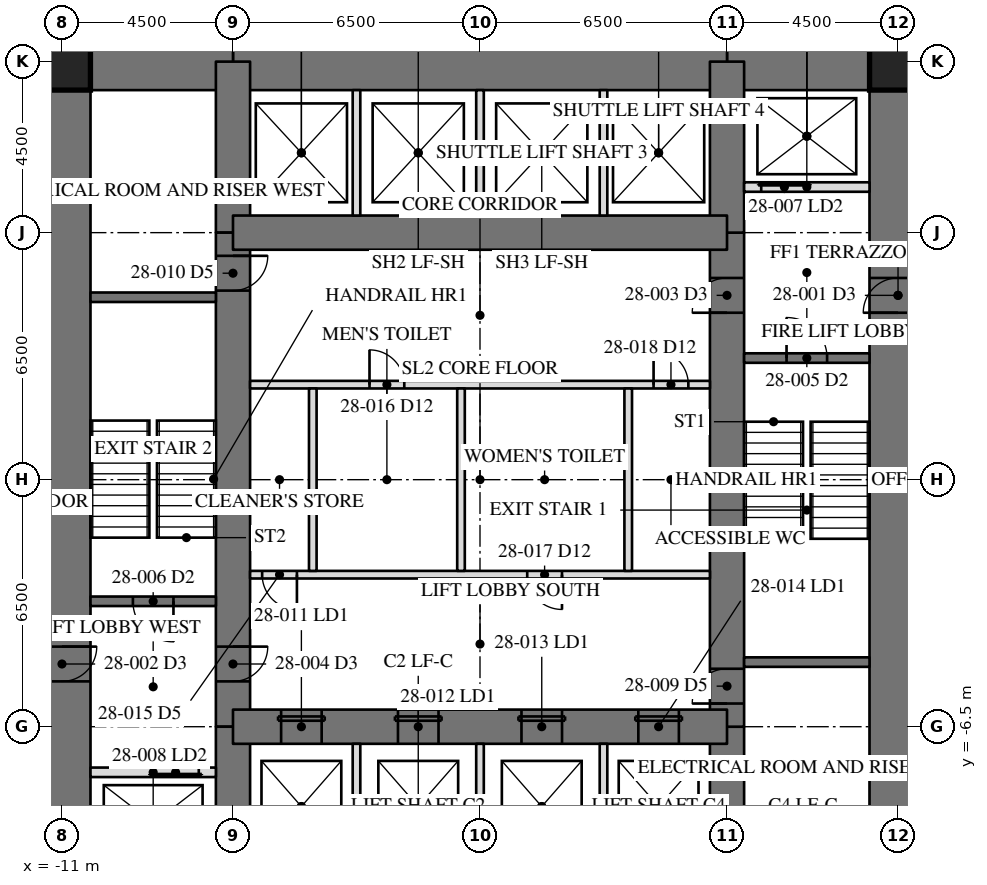
"""IFC4 building model, lengths in metres.
Left out: names, types, materials, properties, quantities, classifications, styles, units other than length and angle.
Written with IfcOpenShell. Run it as: python <this file> out.ifc"""

import sys

from ifc_helpers import new_model, si_unit, direction, frame, frame_2d, origin, origin_2d, place, context, subcontext, project, spatial, rectangle, hollow_rectangle, extrude, element, fill, save


model = new_model("IFC4")
c1 = context("Model", 3, precision=1e-05, world=origin(), true_north=direction((0.0, 1.0)))
c2 = subcontext(c1, "Body", "Model", "MODEL_VIEW")
j1 = project(units=[si_unit("LENGTHUNIT", "METRE"), si_unit("PLANEANGLEUNIT", "RADIAN")], contexts=[c1])
p1 = place(None, origin())
s1 = spatial("IfcSite", under=j1, at=p1, CompositionType="ELEMENT")
p2 = place(p1, origin())
s2 = spatial("IfcBuilding", under=s1, at=p2, CompositionType="ELEMENT")
p3 = place(p2, frame((0.0, 0.0, 121.3)))
s3 = spatial("IfcBuildingStorey", under=s2, at=p3, CompositionType="ELEMENT", Elevation=121.3)
p4 = place(p3, frame((11.0, -11.0, 0.0), z_axis=(0.0, 0.0, 1.0), x_axis=(0.0, 1.0, 0.0)))
e1 = element("IfcWall", 1, at=p4, inside=s3, PredefinedType="SHEAR", context=c2, shape_type="SweptSolid", body=[
    extrude(rectangle(XDim=22.0, YDim=1.5, at=frame_2d((11.0, 0.0))), origin(), (0.0, 0.0, 1.0), 4.1),
])
p5 = place(p4, frame((15.393, 0.0, 0.0)))
e2 = element("IfcOpeningElement", 2, at=p5, cuts=e1, PredefinedType="OPENING", context=c2, shape_type="SweptSolid", body=[
    extrude(rectangle(XDim=0.915, YDim=2.134, at=frame_2d((0.458, 1.067))), frame((0.0, 0.76, 0.0), z_axis=(0.0, -1.0, 0.0), x_axis=(1.0, 0.0, 0.0)), (0.0, 0.0, 1.0), 1.52),
])
p6 = place(p3, frame((-11.0, 11.0, 0.0), z_axis=(0.0, 0.0, 1.0), x_axis=(0.0, -1.0, 0.0)))
e3 = element("IfcWall", 3, at=p6, inside=s3, PredefinedType="SHEAR", context=c2, shape_type="SweptSolid", body=[
    extrude(rectangle(XDim=22.0, YDim=1.5, at=frame_2d((11.0, 0.0))), origin(), (0.0, 0.0, 1.0), 4.1),
])
p7 = place(p6, frame((15.393, 0.0, 0.0)))
e4 = element("IfcOpeningElement", 4, at=p7, cuts=e3, PredefinedType="OPENING", context=c2, shape_type="SweptSolid", body=[
    extrude(rectangle(XDim=0.915, YDim=2.134, at=frame_2d((0.458, 1.067))), frame((0.0, 0.76, 0.0), z_axis=(0.0, -1.0, 0.0), x_axis=(1.0, 0.0, 0.0)), (0.0, 0.0, 1.0), 1.52),
])
p8 = place(p3, frame((11.0, 11.0, 0.0), z_axis=(0.0, 0.0, 1.0), x_axis=(-1.0, 0.0, 0.0)))
e5 = element("IfcWall", 5, at=p8, inside=s3, PredefinedType="SHEAR", context=c2, shape_type="SweptSolid", body=[
    extrude(rectangle(XDim=4.5, YDim=1.5, at=frame_2d((2.25, 0.0))), origin(), (0.0, 0.0, 1.0), 4.1),
])
p9 = place(p3, frame((6.5, 11.0, 0.0), z_axis=(0.0, 0.0, 1.0), x_axis=(-1.0, 0.0, 0.0)))
e6 = element("IfcWall", 6, at=p9, inside=s3, PredefinedType="SHEAR", context=c2, shape_type="SweptSolid", body=[
    extrude(rectangle(XDim=13.0, YDim=1.5, at=frame_2d((6.5, 0.0))), origin(), (0.0, 0.0, 1.0), 4.1),
])
p10 = place(p3, frame((-6.5, 11.0, 0.0), z_axis=(0.0, 0.0, 1.0), x_axis=(-1.0, 0.0, 0.0)))
e7 = element("IfcWall", 7, at=p10, inside=s3, PredefinedType="SHEAR", context=c2, shape_type="SweptSolid", body=[
    extrude(rectangle(XDim=4.5, YDim=1.5, at=frame_2d((2.25, 0.0))), origin(), (0.0, 0.0, 1.0), 4.1),
])
p11 = place(p3, frame((6.5, -11.0, 0.0), z_axis=(0.0, 0.0, 1.0), x_axis=(0.0, 1.0, 0.0)))
e8 = element("IfcWall", 8, at=p11, inside=s3, PredefinedType="SHEAR", context=c2, shape_type="SweptSolid", body=[
    extrude(rectangle(XDim=4.5, YDim=0.9, at=frame_2d((2.25, 0.0))), origin(), (0.0, 0.0, 1.0), 4.1),
])
p12 = place(p3, frame((6.5, -6.5, 0.0), z_axis=(0.0, 0.0, 1.0), x_axis=(0.0, 1.0, 0.0)))
e9 = element("IfcWall", 9, at=p12, inside=s3, PredefinedType="SHEAR", context=c2, shape_type="SweptSolid", body=[
    extrude(rectangle(XDim=13.0, YDim=0.9, at=frame_2d((6.5, 0.0))), origin(), (0.0, 0.0, 1.0), 4.1),
])
p13 = place(p12, frame((10.893, 0.0, 0.0)))
e10 = element("IfcOpeningElement", 10, at=p13, cuts=e9, PredefinedType="OPENING", context=c2, shape_type="SweptSolid", body=[
    extrude(rectangle(XDim=0.915, YDim=2.134, at=frame_2d((0.458, 1.067))), frame((0.0, 0.46, 0.0), z_axis=(0.0, -1.0, 0.0), x_axis=(1.0, 0.0, 0.0)), (0.0, 0.0, 1.0), 0.92),
])
p14 = place(p12, frame((0.61, 0.0, 0.0)))
e11 = element("IfcOpeningElement", 11, at=p14, cuts=e9, PredefinedType="OPENING", context=c2, shape_type="SweptSolid", body=[
    extrude(rectangle(XDim=0.915, YDim=2.134, at=frame_2d((0.458, 1.067))), frame((0.0, 0.46, 0.0), z_axis=(0.0, -1.0, 0.0), x_axis=(1.0, 0.0, 0.0)), (0.0, 0.0, 1.0), 0.92),
])
for number, where, z_axis, x_axis in (
    (12, (6.5, 6.5, 0.0), (0.0, 0.0, 1.0), (0.0, 1.0, 0.0)),
    (13, (-6.5, 11.0, 0.0), (0.0, 0.0, 1.0), (0.0, -1.0, 0.0)),
):
    element("IfcWall", number, at=place(p3, frame(where, z_axis=z_axis, x_axis=x_axis)), inside=s3, PredefinedType="SHEAR", context=c2, shape_type="SweptSolid", body=[
        extrude(rectangle(XDim=4.5, YDim=0.9, at=frame_2d((2.25, 0.0))), origin(), (0.0, 0.0, 1.0), 4.1),
    ])
p15 = place(p3, frame((-6.5, 6.5, 0.0), z_axis=(0.0, 0.0, 1.0), x_axis=(0.0, -1.0, 0.0)))
e14 = element("IfcWall", 14, at=p15, inside=s3, PredefinedType="SHEAR", context=c2, shape_type="SweptSolid", body=[
    extrude(rectangle(XDim=13.0, YDim=0.9, at=frame_2d((6.5, 0.0))), origin(), (0.0, 0.0, 1.0), 4.1),
])
p16 = place(p15, frame((10.893, 0.0, 0.0)))
e15 = element("IfcOpeningElement", 15, at=p16, cuts=e14, PredefinedType="OPENING", context=c2, shape_type="SweptSolid", body=[
    extrude(rectangle(XDim=0.915, YDim=2.134, at=frame_2d((0.458, 1.067))), frame((0.0, 0.46, 0.0), z_axis=(0.0, -1.0, 0.0), x_axis=(1.0, 0.0, 0.0)), (0.0, 0.0, 1.0), 0.92),
])
p17 = place(p15, frame((0.61, 0.0, 0.0)))
e16 = element("IfcOpeningElement", 16, at=p17, cuts=e14, PredefinedType="OPENING", context=c2, shape_type="SweptSolid", body=[
    extrude(rectangle(XDim=0.915, YDim=2.134, at=frame_2d((0.458, 1.067))), frame((0.0, 0.46, 0.0), z_axis=(0.0, -1.0, 0.0), x_axis=(1.0, 0.0, 0.0)), (0.0, 0.0, 1.0), 0.92),
])
p18 = place(p3, frame((-6.5, -6.5, 0.0), z_axis=(0.0, 0.0, 1.0), x_axis=(0.0, -1.0, 0.0)))
e17 = element("IfcWall", 17, at=p18, inside=s3, PredefinedType="SHEAR", context=c2, shape_type="SweptSolid", body=[
    extrude(rectangle(XDim=4.5, YDim=0.9, at=frame_2d((2.25, 0.0))), origin(), (0.0, 0.0, 1.0), 4.1),
])
p19 = place(p3, frame((6.5, 6.5, 0.0), z_axis=(0.0, 0.0, 1.0), x_axis=(-1.0, 0.0, 0.0)))
e18 = element("IfcWall", 18, at=p19, inside=s3, PredefinedType="SHEAR", context=c2, shape_type="SweptSolid", body=[
    extrude(rectangle(XDim=13.0, YDim=0.9, at=frame_2d((6.5, 0.0))), origin(), (0.0, 0.0, 1.0), 4.1),
])
p20 = place(p3, frame((-6.5, -6.5, 0.0), z_axis=(0.0, 0.0, 1.0), x_axis=(1.0, 0.0, 0.0)))
e19 = element("IfcWall", 19, at=p20, inside=s3, PredefinedType="SHEAR", context=c2, shape_type="SweptSolid", body=[
    extrude(rectangle(XDim=13.0, YDim=0.9, at=frame_2d((6.5, 0.0))), origin(), (0.0, 0.0, 1.0), 4.1),
])
p21 = place(p20, frame((1.267, 0.0, 0.0)))
e20 = element("IfcOpeningElement", 20, at=p21, cuts=e19, PredefinedType="OPENING", context=c2, shape_type="SweptSolid", body=[
    extrude(rectangle(XDim=1.067, YDim=2.134, at=frame_2d((0.533, 1.067))), frame((0.0, 0.46, 0.0), z_axis=(0.0, -1.0, 0.0), x_axis=(1.0, 0.0, 0.0)), (0.0, 0.0, 1.0), 0.92),
])
p22 = place(p20, frame((4.342, 0.0, 0.0)))
e21 = element("IfcOpeningElement", 21, at=p22, cuts=e19, PredefinedType="OPENING", context=c2, shape_type="SweptSolid", body=[
    extrude(rectangle(XDim=1.067, YDim=2.134, at=frame_2d((0.533, 1.067))), frame((0.0, 0.46, 0.0), z_axis=(0.0, -1.0, 0.0), x_axis=(1.0, 0.0, 0.0)), (0.0, 0.0, 1.0), 0.92),
])
p23 = place(p20, frame((7.592, 0.0, 0.0)))
e22 = element("IfcOpeningElement", 22, at=p23, cuts=e19, PredefinedType="OPENING", context=c2, shape_type="SweptSolid", body=[
    extrude(rectangle(XDim=1.067, YDim=2.134, at=frame_2d((0.533, 1.067))), frame((0.0, 0.46, 0.0), z_axis=(0.0, -1.0, 0.0), x_axis=(1.0, 0.0, 0.0)), (0.0, 0.0, 1.0), 0.92),
])
p24 = place(p20, frame((10.667, 0.0, 0.0)))
e23 = element("IfcOpeningElement", 23, at=p24, cuts=e19, PredefinedType="OPENING", context=c2, shape_type="SweptSolid", body=[
    extrude(rectangle(XDim=1.067, YDim=2.134, at=frame_2d((0.533, 1.067))), frame((0.0, 0.46, 0.0), z_axis=(0.0, -1.0, 0.0), x_axis=(1.0, 0.0, 0.0)), (0.0, 0.0, 1.0), 0.92),
])
for number, where, z_axis, x_axis in (
    (24, (11.0, 11.0, 0.0), (0.0, 0.0, 1.0), (1.0, 0.0, 0.0)),
    (25, (-11.0, 11.0, 0.0), (0.0, 0.0, 1.0), (1.0, 0.0, 0.0)),
):
    element("IfcColumn", number, at=place(p3, frame(where, z_axis=z_axis, x_axis=x_axis)), inside=s3, PredefinedType="COLUMN", context=c2, shape_type="SweptSolid", body=[
        extrude(hollow_rectangle(XDim=1.499, YDim=1.499, WallThickness=0.102, at=origin_2d()), origin(), (0.0, 0.0, 1.0), 4.1),
    ])
for number, where, z_axis, x_axis in (
    (26, (6.95, -4.8, 0.0), (0.0, 0.0, 1.0), (1.0, 0.0, 0.0)),
    (27, (-6.95, 4.8, 0.0), (0.0, 0.0, 1.0), (-1.0, 0.0, 0.0)),
):
    element("IfcWall", number, at=place(p3, frame(where, z_axis=z_axis, x_axis=x_axis)), inside=s3, PredefinedType="SOLIDWALL", context=c2, shape_type="SweptSolid", body=[
        extrude(rectangle(XDim=3.3, YDim=0.25, at=frame_2d((1.65, 0.0))), origin(), (0.0, 0.0, 1.0), 3.91),
    ])
p25 = place(p3, frame((6.95, 3.2, 0.0), z_axis=(0.0, 0.0, 1.0), x_axis=(1.0, 0.0, 0.0)))
e28 = element("IfcWall", 28, at=p25, inside=s3, PredefinedType="SOLIDWALL", context=c2, shape_type="SweptSolid", body=[
    extrude(rectangle(XDim=3.3, YDim=0.25, at=frame_2d((1.65, 0.0))), origin(), (0.0, 0.0, 1.0), 3.91),
])
p26 = place(p25, frame((1.116, 0.0, 0.0)))
e29 = element("IfcOpeningElement", 29, at=p26, cuts=e28, PredefinedType="OPENING", context=c2, shape_type="SweptSolid", body=[
    extrude(rectangle(XDim=1.067, YDim=2.134, at=frame_2d((0.533, 1.067))), frame((0.0, 0.135, 0.0), z_axis=(0.0, -1.0, 0.0), x_axis=(1.0, 0.0, 0.0)), (0.0, 0.0, 1.0), 0.27),
])
p27 = place(p3, frame((-6.95, -3.2, 0.0), z_axis=(0.0, 0.0, 1.0), x_axis=(-1.0, 0.0, 0.0)))
e30 = element("IfcWall", 30, at=p27, inside=s3, PredefinedType="SOLIDWALL", context=c2, shape_type="SweptSolid", body=[
    extrude(rectangle(XDim=3.3, YDim=0.25, at=frame_2d((1.65, 0.0))), origin(), (0.0, 0.0, 1.0), 3.91),
])
p28 = place(p27, frame((1.116, 0.0, 0.0)))
e31 = element("IfcOpeningElement", 31, at=p28, cuts=e30, PredefinedType="OPENING", context=c2, shape_type="SweptSolid", body=[
    extrude(rectangle(XDim=1.067, YDim=2.134, at=frame_2d((0.533, 1.067))), frame((0.0, 0.135, 0.0), z_axis=(0.0, -1.0, 0.0), x_axis=(1.0, 0.0, 0.0)), (0.0, 0.0, 1.0), 0.27),
])
p29 = place(p3, frame((6.95, 7.7, 0.0), z_axis=(0.0, 0.0, 1.0), x_axis=(1.0, 0.0, 0.0)))
e32 = element("IfcWall", 32, at=p29, inside=s3, PredefinedType="PARTITIONING", context=c2, shape_type="SweptSolid", body=[
    extrude(rectangle(XDim=3.3, YDim=0.25, at=frame_2d((1.65, 0.0))), origin(), (0.0, 0.0, 1.0), 3.91),
])
p30 = place(p29, frame((0.45, 0.0, 0.0)))
e33 = element("IfcOpeningElement", 33, at=p30, cuts=e32, PredefinedType="OPENING", context=c2, shape_type="SweptSolid", body=[
    extrude(rectangle(XDim=1.219, YDim=2.134, at=frame_2d((0.609, 1.067))), frame((0.0, 0.135, 0.0), z_axis=(0.0, -1.0, 0.0), x_axis=(1.0, 0.0, 0.0)), (0.0, 0.0, 1.0), 0.27),
])
p31 = place(p3, frame((-6.95, -7.7, 0.0), z_axis=(0.0, 0.0, 1.0), x_axis=(-1.0, 0.0, 0.0)))
e34 = element("IfcWall", 34, at=p31, inside=s3, PredefinedType="PARTITIONING", context=c2, shape_type="SweptSolid", body=[
    extrude(rectangle(XDim=3.3, YDim=0.25, at=frame_2d((1.65, 0.0))), origin(), (0.0, 0.0, 1.0), 3.91),
])
p32 = place(p31, frame((0.45, 0.0, 0.0)))
e35 = element("IfcOpeningElement", 35, at=p32, cuts=e34, PredefinedType="OPENING", context=c2, shape_type="SweptSolid", body=[
    extrude(rectangle(XDim=1.219, YDim=2.134, at=frame_2d((0.609, 1.067))), frame((0.0, 0.135, 0.0), z_axis=(0.0, -1.0, 0.0), x_axis=(1.0, 0.0, 0.0)), (0.0, 0.0, 1.0), 0.27),
])
p33 = place(p3, frame((-6.05, 2.5, 0.0), z_axis=(0.0, 0.0, 1.0), x_axis=(1.0, 0.0, 0.0)))
e36 = element("IfcWall", 36, at=p33, inside=s3, PredefinedType="PARTITIONING", context=c2, shape_type="SweptSolid", body=[
    extrude(rectangle(XDim=12.1, YDim=0.2, at=frame_2d((6.05, 0.0))), origin(), (0.0, 0.0, 1.0), 3.91),
])
p34 = place(p33, frame((3.143, 0.0, 0.0)))
e37 = element("IfcOpeningElement", 37, at=p34, cuts=e36, PredefinedType="OPENING", context=c2, shape_type="SweptSolid", body=[
    extrude(rectangle(XDim=0.915, YDim=2.134, at=frame_2d((0.458, 1.067))), frame((0.0, 0.11, 0.0), z_axis=(0.0, -1.0, 0.0), x_axis=(1.0, 0.0, 0.0)), (0.0, 0.0, 1.0), 0.22),
])
p35 = place(p33, frame((10.617, 0.0, 0.0)))
e38 = element("IfcOpeningElement", 38, at=p35, cuts=e36, PredefinedType="OPENING", context=c2, shape_type="SweptSolid", body=[
    extrude(rectangle(XDim=0.915, YDim=2.134, at=frame_2d((0.458, 1.067))), frame((0.0, 0.11, 0.0), z_axis=(0.0, -1.0, 0.0), x_axis=(1.0, 0.0, 0.0)), (0.0, 0.0, 1.0), 0.22),
])
p36 = place(p3, frame((6.05, -2.5, 0.0), z_axis=(0.0, 0.0, 1.0), x_axis=(-1.0, 0.0, 0.0)))
e39 = element("IfcWall", 39, at=p36, inside=s3, PredefinedType="PARTITIONING", context=c2, shape_type="SweptSolid", body=[
    extrude(rectangle(XDim=12.1, YDim=0.2, at=frame_2d((6.05, 0.0))), origin(), (0.0, 0.0, 1.0), 3.91),
])
p37 = place(p36, frame((10.867, 0.0, 0.0)))
e40 = element("IfcOpeningElement", 40, at=p37, cuts=e39, PredefinedType="OPENING", context=c2, shape_type="SweptSolid", body=[
    extrude(rectangle(XDim=0.915, YDim=2.134, at=frame_2d((0.458, 1.067))), frame((0.0, 0.11, 0.0), z_axis=(0.0, -1.0, 0.0), x_axis=(1.0, 0.0, 0.0)), (0.0, 0.0, 1.0), 0.22),
])
p38 = place(p36, frame((3.893, 0.0, 0.0)))
e41 = element("IfcOpeningElement", 41, at=p38, cuts=e39, PredefinedType="OPENING", context=c2, shape_type="SweptSolid", body=[
    extrude(rectangle(XDim=0.915, YDim=2.134, at=frame_2d((0.458, 1.067))), frame((0.0, 0.11, 0.0), z_axis=(0.0, -1.0, 0.0), x_axis=(1.0, 0.0, 0.0)), (0.0, 0.0, 1.0), 0.22),
])
for number, where, z_axis, x_axis in (
    (42, (-3.25, 6.95, 0.0), (0.0, 0.0, 1.0), (0.0, 1.0, 0.0)),
    (43, (0.0, 6.95, 0.0), (0.0, 0.0, 1.0), (0.0, 1.0, 0.0)),
    (44, (3.25, 6.95, 0.0), (0.0, 0.0, 1.0), (0.0, 1.0, 0.0)),
    (45, (-3.25, -10.25, 0.0), (0.0, 0.0, 1.0), (0.0, 1.0, 0.0)),
    (46, (0.0, -10.25, 0.0), (0.0, 0.0, 1.0), (0.0, 1.0, 0.0)),
    (47, (3.25, -10.25, 0.0), (0.0, 0.0, 1.0), (0.0, 1.0, 0.0)),
):
    element("IfcWall", number, at=place(p3, frame(where, z_axis=z_axis, x_axis=x_axis)), inside=s3, PredefinedType="PARTITIONING", context=c2, shape_type="SweptSolid", body=[
        extrude(rectangle(XDim=3.3, YDim=0.2, at=frame_2d((1.65, 0.0))), origin(), (0.0, 0.0, 1.0), 3.91),
    ])
for number, where, z_axis, x_axis in (
    (48, (-4.4, -2.4, 0.0), (0.0, 0.0, 1.0), (0.0, 1.0, 0.0)),
    (49, (-0.5, -2.4, 0.0), (0.0, 0.0, 1.0), (0.0, 1.0, 0.0)),
    (50, (3.9, -2.4, 0.0), (0.0, 0.0, 1.0), (0.0, 1.0, 0.0)),
):
    element("IfcWall", number, at=place(p3, frame(where, z_axis=z_axis, x_axis=x_axis)), inside=s3, PredefinedType="PARTITIONING", context=c2, shape_type="SweptSolid", body=[
        extrude(rectangle(XDim=4.8, YDim=0.2, at=frame_2d((2.4, 0.0))), origin(), (0.0, 0.0, 1.0), 3.91),
    ])
p39 = place(p13, origin())
e51 = element("IfcDoor", 51, at=p39, inside=s3, OperationType="SINGLE_SWING_RIGHT", PredefinedType="DOOR", context=c2, shape_type="SweptSolid", body=[
    extrude(rectangle(XDim=0.915, YDim=2.134, at=frame_2d((0.458, 1.067))), frame((0.0, -0.375, 0.0), z_axis=(0.0, -1.0, 0.0), x_axis=(1.0, 0.0, 0.0)), (0.0, 0.0, 1.0), 0.05),
])
fill(e10, e51)
p40 = place(p16, origin())
e52 = element("IfcDoor", 52, at=p40, inside=s3, OperationType="SINGLE_SWING_RIGHT", PredefinedType="DOOR", context=c2, shape_type="SweptSolid", body=[
    extrude(rectangle(XDim=0.915, YDim=2.134, at=frame_2d((0.458, 1.067))), frame((0.0, -0.375, 0.0), z_axis=(0.0, -1.0, 0.0), x_axis=(1.0, 0.0, 0.0)), (0.0, 0.0, 1.0), 0.05),
])
fill(e15, e52)
p41 = place(p26, origin())
e53 = element("IfcDoor", 53, at=p41, inside=s3, OperationType="SINGLE_SWING_LEFT", PredefinedType="DOOR", context=c2, shape_type="SweptSolid", body=[
    extrude(rectangle(XDim=1.067, YDim=2.134, at=frame_2d((0.533, 1.067))), frame((0.0, 0.025, 0.0), z_axis=(0.0, -1.0, 0.0), x_axis=(1.0, 0.0, 0.0)), (0.0, 0.0, 1.0), 0.05),
])
fill(e29, e53)
p42 = place(p28, origin())
e54 = element("IfcDoor", 54, at=p42, inside=s3, OperationType="SINGLE_SWING_LEFT", PredefinedType="DOOR", context=c2, shape_type="SweptSolid", body=[
    extrude(rectangle(XDim=1.067, YDim=2.134, at=frame_2d((0.533, 1.067))), frame((0.0, 0.025, 0.0), z_axis=(0.0, -1.0, 0.0), x_axis=(1.0, 0.0, 0.0)), (0.0, 0.0, 1.0), 0.05),
])
fill(e31, e54)
p43 = place(p30, origin())
e55 = element("IfcDoor", 55, at=p43, inside=s3, OperationType="SLIDING_TO_LEFT", PredefinedType="DOOR", context=c2, shape_type="SweptSolid", body=[
    extrude(rectangle(XDim=1.219, YDim=2.134, at=frame_2d((0.609, 1.067))), frame((0.0, 0.025, 0.0), z_axis=(0.0, -1.0, 0.0), x_axis=(1.0, 0.0, 0.0)), (0.0, 0.0, 1.0), 0.05),
])
fill(e33, e55)
p44 = place(p32, origin())
e56 = element("IfcDoor", 56, at=p44, inside=s3, OperationType="SLIDING_TO_LEFT", PredefinedType="DOOR", context=c2, shape_type="SweptSolid", body=[
    extrude(rectangle(XDim=1.219, YDim=2.134, at=frame_2d((0.609, 1.067))), frame((0.0, 0.025, 0.0), z_axis=(0.0, -1.0, 0.0), x_axis=(1.0, 0.0, 0.0)), (0.0, 0.0, 1.0), 0.05),
])
fill(e35, e56)
p45 = place(p14, origin())
e57 = element("IfcDoor", 57, at=p45, inside=s3, OperationType="SINGLE_SWING_RIGHT", PredefinedType="DOOR", context=c2, shape_type="SweptSolid", body=[
    extrude(rectangle(XDim=0.915, YDim=2.134, at=frame_2d((0.458, 1.067))), frame((0.0, -0.375, 0.0), z_axis=(0.0, -1.0, 0.0), x_axis=(1.0, 0.0, 0.0)), (0.0, 0.0, 1.0), 0.05),
])
fill(e11, e57)
p46 = place(p17, origin())
e58 = element("IfcDoor", 58, at=p46, inside=s3, OperationType="SINGLE_SWING_RIGHT", PredefinedType="DOOR", context=c2, shape_type="SweptSolid", body=[
    extrude(rectangle(XDim=0.915, YDim=2.134, at=frame_2d((0.458, 1.067))), frame((0.0, -0.375, 0.0), z_axis=(0.0, -1.0, 0.0), x_axis=(1.0, 0.0, 0.0)), (0.0, 0.0, 1.0), 0.05),
])
fill(e16, e58)
p47 = place(p21, origin())
e59 = element("IfcDoor", 59, at=p47, inside=s3, OperationType="SLIDING_TO_LEFT", PredefinedType="DOOR", context=c2, shape_type="SweptSolid", body=[
    extrude(rectangle(XDim=1.067, YDim=2.134, at=frame_2d((0.533, 1.067))), frame((0.0, -0.375, 0.0), z_axis=(0.0, -1.0, 0.0), x_axis=(1.0, 0.0, 0.0)), (0.0, 0.0, 1.0), 0.05),
])
fill(e20, e59)
p48 = place(p22, origin())
e60 = element("IfcDoor", 60, at=p48, inside=s3, OperationType="SLIDING_TO_LEFT", PredefinedType="DOOR", context=c2, shape_type="SweptSolid", body=[
    extrude(rectangle(XDim=1.067, YDim=2.134, at=frame_2d((0.533, 1.067))), frame((0.0, -0.375, 0.0), z_axis=(0.0, -1.0, 0.0), x_axis=(1.0, 0.0, 0.0)), (0.0, 0.0, 1.0), 0.05),
])
fill(e21, e60)
p49 = place(p23, origin())
e61 = element("IfcDoor", 61, at=p49, inside=s3, OperationType="SLIDING_TO_LEFT", PredefinedType="DOOR", context=c2, shape_type="SweptSolid", body=[
    extrude(rectangle(XDim=1.067, YDim=2.134, at=frame_2d((0.533, 1.067))), frame((0.0, -0.375, 0.0), z_axis=(0.0, -1.0, 0.0), x_axis=(1.0, 0.0, 0.0)), (0.0, 0.0, 1.0), 0.05),
])
fill(e22, e61)
p50 = place(p24, origin())
e62 = element("IfcDoor", 62, at=p50, inside=s3, OperationType="SLIDING_TO_LEFT", PredefinedType="DOOR", context=c2, shape_type="SweptSolid", body=[
    extrude(rectangle(XDim=1.067, YDim=2.134, at=frame_2d((0.533, 1.067))), frame((0.0, -0.375, 0.0), z_axis=(0.0, -1.0, 0.0), x_axis=(1.0, 0.0, 0.0)), (0.0, 0.0, 1.0), 0.05),
])
fill(e23, e62)
p51 = place(p37, origin())
e63 = element("IfcDoor", 63, at=p51, inside=s3, OperationType="SINGLE_SWING_RIGHT", PredefinedType="DOOR", context=c2, shape_type="SweptSolid", body=[
    extrude(rectangle(XDim=0.915, YDim=2.134, at=frame_2d((0.458, 1.067))), frame((0.0, 0.025, 0.0), z_axis=(0.0, -1.0, 0.0), x_axis=(1.0, 0.0, 0.0)), (0.0, 0.0, 1.0), 0.05),
])
fill(e40, e63)
p52 = place(p34, origin())
e64 = element("IfcDoor", 64, at=p52, inside=s3, OperationType="SINGLE_SWING_LEFT", PredefinedType="DOOR", context=c2, shape_type="SweptSolid", body=[
    extrude(rectangle(XDim=0.915, YDim=2.134, at=frame_2d((0.458, 1.067))), frame((0.0, 0.025, 0.0), z_axis=(0.0, -1.0, 0.0), x_axis=(1.0, 0.0, 0.0)), (0.0, 0.0, 1.0), 0.05),
])
fill(e37, e64)
p53 = place(p38, origin())
e65 = element("IfcDoor", 65, at=p53, inside=s3, OperationType="SINGLE_SWING_LEFT", PredefinedType="DOOR", context=c2, shape_type="SweptSolid", body=[
    extrude(rectangle(XDim=0.915, YDim=2.134, at=frame_2d((0.458, 1.067))), frame((0.0, 0.025, 0.0), z_axis=(0.0, -1.0, 0.0), x_axis=(1.0, 0.0, 0.0)), (0.0, 0.0, 1.0), 0.05),
])
fill(e41, e65)
p54 = place(p35, origin())
e66 = element("IfcDoor", 66, at=p54, inside=s3, OperationType="SINGLE_SWING_LEFT", PredefinedType="DOOR", context=c2, shape_type="SweptSolid", body=[
    extrude(rectangle(XDim=0.915, YDim=2.134, at=frame_2d((0.458, 1.067))), frame((0.0, 0.025, 0.0), z_axis=(0.0, -1.0, 0.0), x_axis=(1.0, 0.0, 0.0)), (0.0, 0.0, 1.0), 0.05),
])
fill(e38, e66)
save(model, sys.argv[1])
